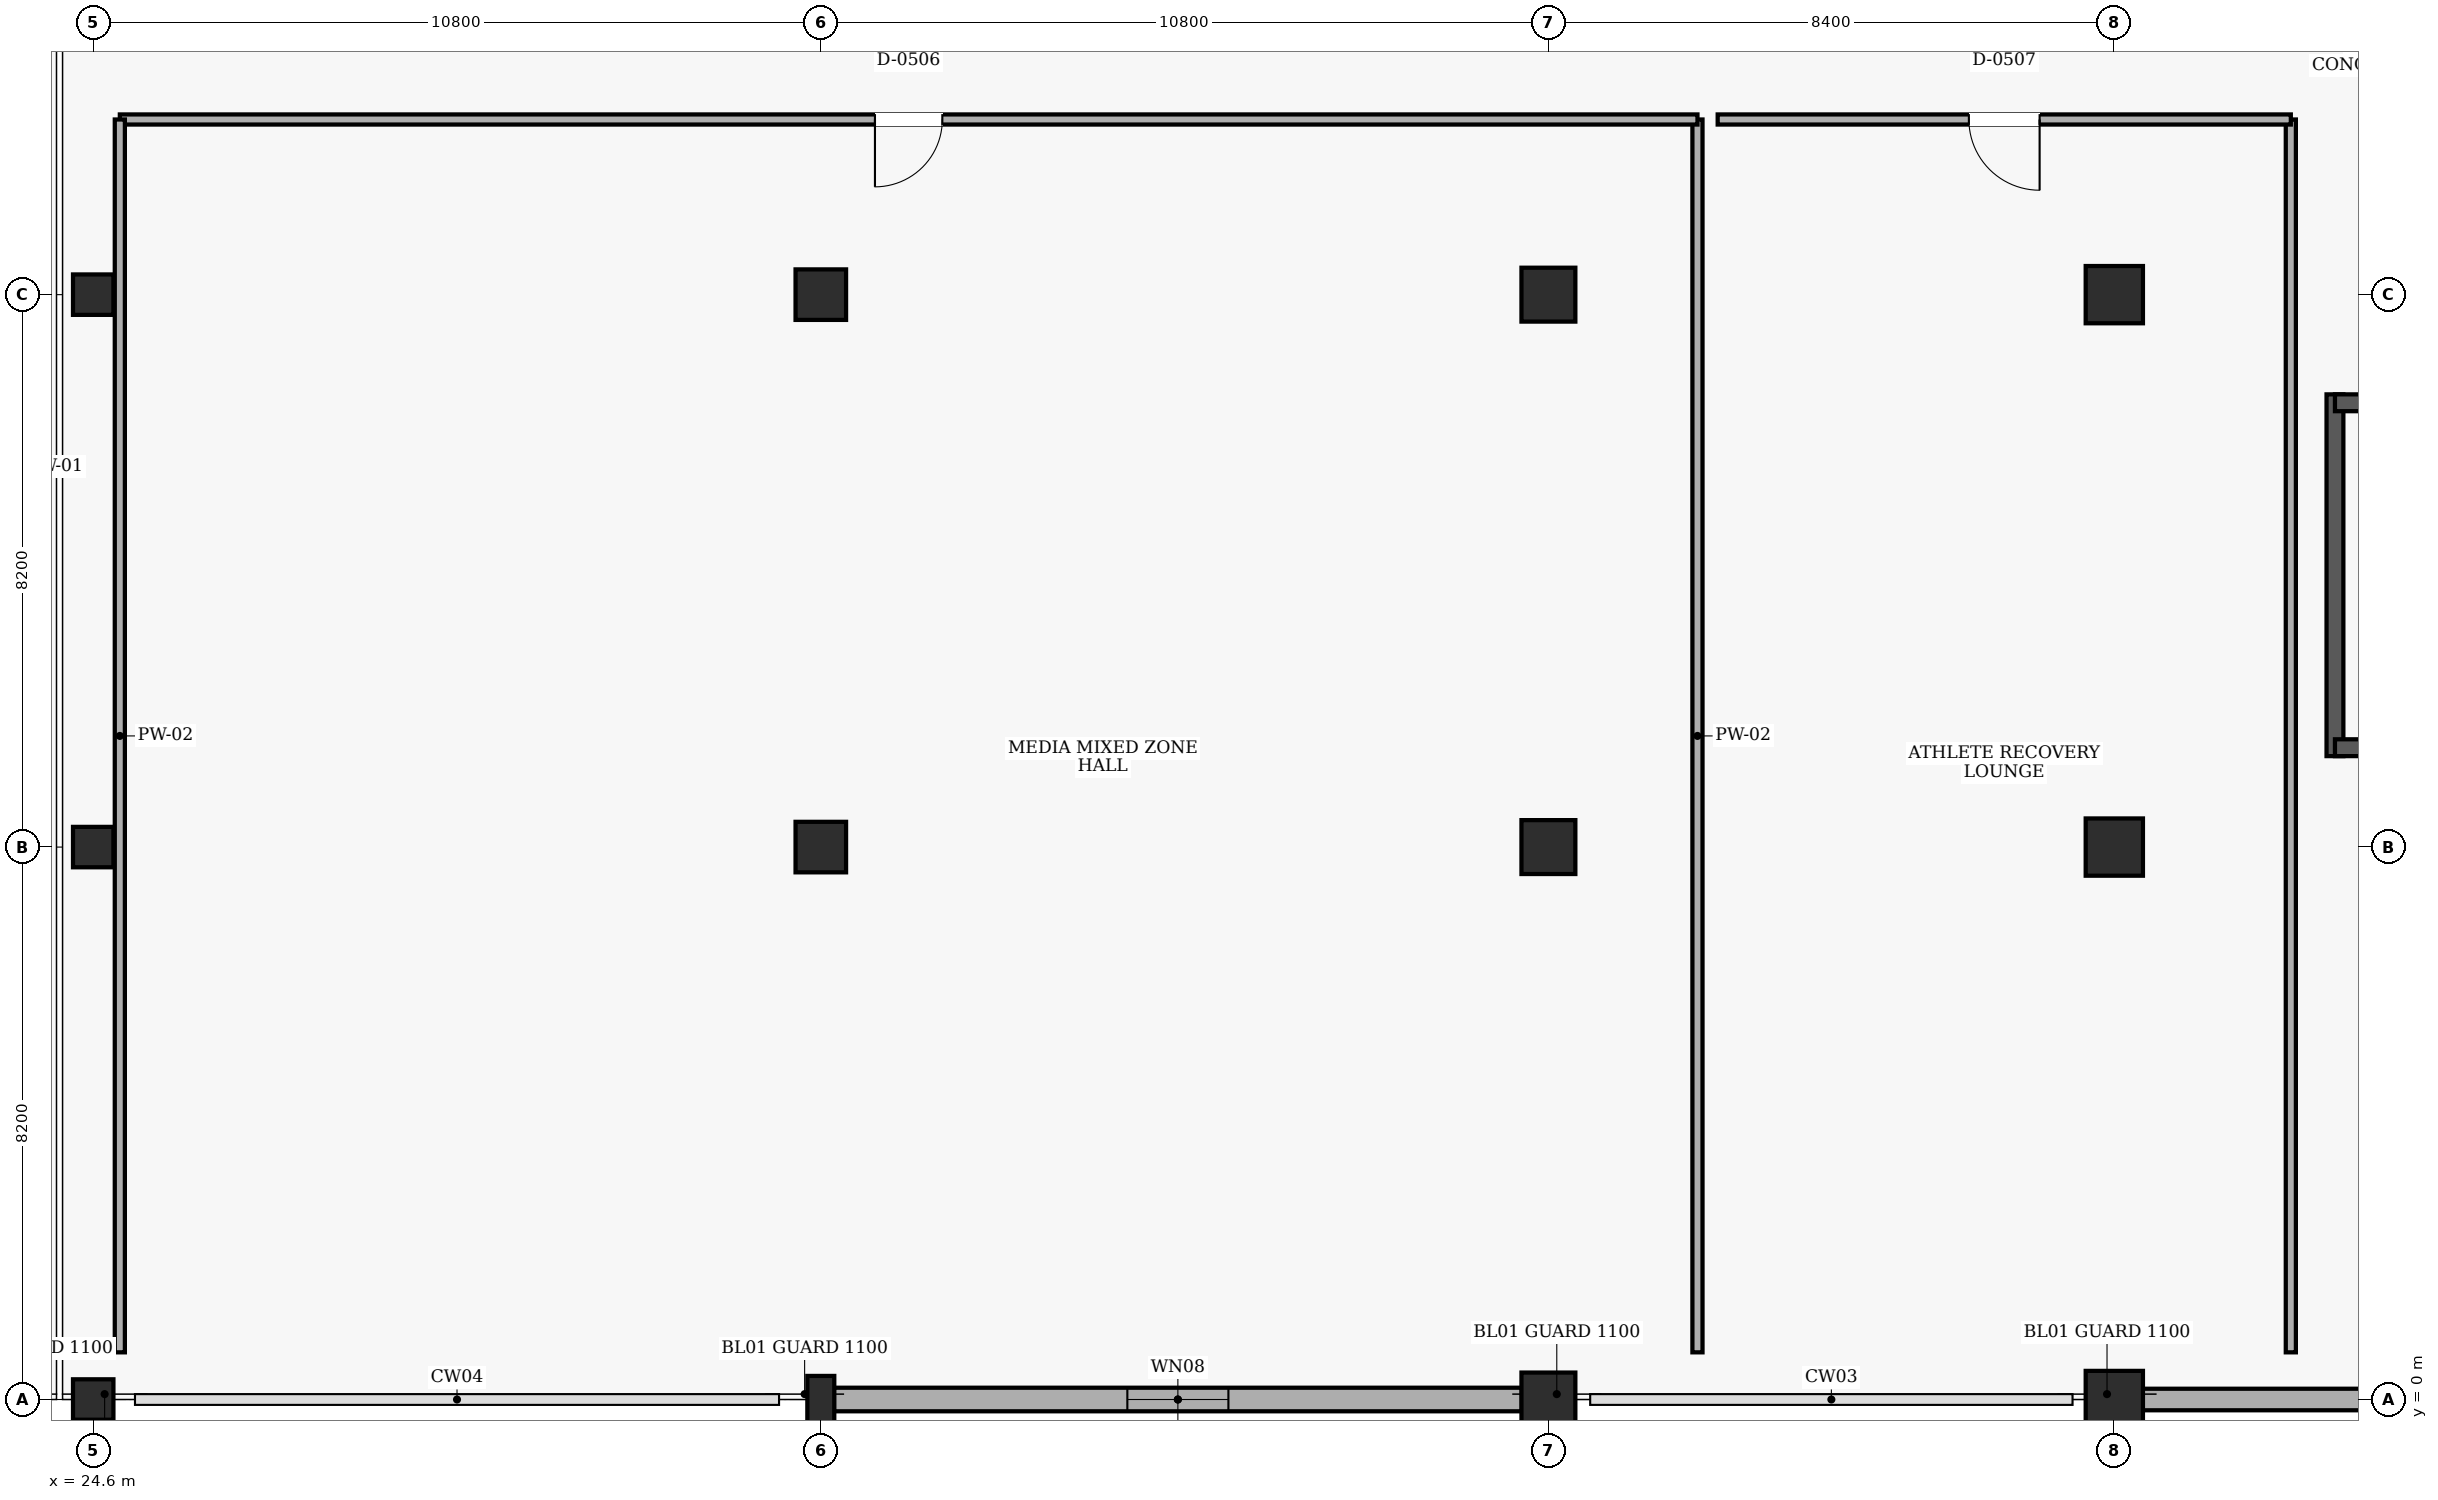
"""IFC4 building model, lengths in metres.
Left out: names, types, materials, properties, quantities, classifications, styles, units other than length and angle.
Written with IfcOpenShell. Run it as: python <this file> out.ifc"""

import sys

from ifc_helpers import new_model, si_unit, direction, frame, frame_2d, origin, origin_2d, place, context, subcontext, project, spatial, rectangle, extrude, element, fill, save


model = new_model("IFC4")
c1 = context("Model", 3, precision=1e-05, world=origin(), true_north=direction((0.0, 1.0)))
c2 = subcontext(c1, "Body", "Model", "MODEL_VIEW")
j1 = project(units=[si_unit("LENGTHUNIT", "METRE"), si_unit("PLANEANGLEUNIT", "RADIAN")], contexts=[c1])
p1 = place(None, origin())
s1 = spatial("IfcSite", under=j1, at=p1, CompositionType="ELEMENT")
p2 = place(p1, origin())
s2 = spatial("IfcBuilding", under=s1, at=p2, CompositionType="ELEMENT")
p3 = place(p2, frame((0.0, 0.0, 5.4)))
s3 = spatial("IfcBuildingStorey", under=s2, at=p3, CompositionType="ELEMENT", Elevation=5.4)
for number, where, z_axis, x_axis in (
    (1, (24.6, 0.0, 0.0), (0.0, 0.0, 1.0), (1.0, 0.0, 0.0)),
    (2, (24.6, 8.2, 0.0), (0.0, 0.0, 1.0), (1.0, 0.0, 0.0)),
    (3, (24.6, 16.4, 0.0), (0.0, 0.0, 1.0), (1.0, 0.0, 0.0)),
):
    element("IfcColumn", number, at=place(p3, frame(where, z_axis=z_axis, x_axis=x_axis)), inside=s3, PredefinedType="COLUMN", context=c2, shape_type="SweptSolid", body=[
        extrude(rectangle(XDim=0.6, YDim=0.6, at=origin_2d()), origin(), (0.0, 0.0, 1.0), 4.8),
    ])
p4 = place(p3, frame((35.4, 0.0, 0.0), z_axis=(0.0, 0.0, 1.0), x_axis=(1.0, 0.0, 0.0)))
e4 = element("IfcColumn", 4, at=p4, inside=s3, PredefinedType="PILASTER", context=c2, shape_type="SweptSolid", body=[
    extrude(rectangle(XDim=0.4, YDim=0.7, at=origin_2d()), origin(), (0.0, 0.0, 1.0), 4.8),
])
for number, where, z_axis, x_axis in (
    (5, (35.4, 8.2, 0.0), (0.0, 0.0, 1.0), (1.0, 0.0, 0.0)),
    (6, (35.4, 16.4, 0.0), (0.0, 0.0, 1.0), (1.0, 0.0, 0.0)),
):
    element("IfcColumn", number, at=place(p3, frame(where, z_axis=z_axis, x_axis=x_axis)), inside=s3, PredefinedType="COLUMN", context=c2, shape_type="SweptSolid", body=[
        extrude(rectangle(XDim=0.75, YDim=0.75, at=origin_2d()), origin(), (0.0, 0.0, 1.0), 4.8),
    ])
for number, where, z_axis, x_axis in (
    (7, (46.2, 0.0, 0.0), (0.0, 0.0, 1.0), (1.0, 0.0, 0.0)),
    (8, (46.2, 8.2, 0.0), (0.0, 0.0, 1.0), (1.0, 0.0, 0.0)),
    (9, (46.2, 16.4, 0.0), (0.0, 0.0, 1.0), (1.0, 0.0, 0.0)),
):
    element("IfcColumn", number, at=place(p3, frame(where, z_axis=z_axis, x_axis=x_axis)), inside=s3, PredefinedType="COLUMN", context=c2, shape_type="SweptSolid", body=[
        extrude(rectangle(XDim=0.8, YDim=0.8, at=origin_2d()), origin(), (0.0, 0.0, 1.0), 4.8),
    ])
for number, where, z_axis, x_axis in (
    (10, (54.6, 0.0, 0.0), (0.0, 0.0, 1.0), (1.0, 0.0, 0.0)),
    (11, (54.6, 8.2, 0.0), (0.0, 0.0, 1.0), (1.0, 0.0, 0.0)),
    (12, (54.6, 16.4, 0.0), (0.0, 0.0, 1.0), (1.0, 0.0, 0.0)),
):
    element("IfcColumn", number, at=place(p3, frame(where, z_axis=z_axis, x_axis=x_axis)), inside=s3, PredefinedType="COLUMN", context=c2, shape_type="SweptSolid", body=[
        extrude(rectangle(XDim=0.85, YDim=0.85, at=origin_2d()), origin(), (0.0, 0.0, 1.0), 4.8),
    ])
p5 = place(p3, frame((63.38, 0.0, 0.0), z_axis=(0.0, 0.0, 1.0), x_axis=(-1.0, 0.0, 0.0)))
e13 = element("IfcWall", 13, at=p5, inside=s3, PredefinedType="SOLIDWALL", context=c2, shape_type="SweptSolid", body=[
    extrude(rectangle(XDim=8.36, YDim=0.32, at=frame_2d((4.18, 0.0))), origin(), (0.0, 0.0, 1.0), 3.68),
])
p6 = place(p5, frame((3.58, 0.0, 0.9)))
e14 = element("IfcOpeningElement", 14, at=p6, cuts=e13, PredefinedType="OPENING", context=c2, shape_type="SweptSolid", body=[
    extrude(rectangle(XDim=1.2, YDim=1.8, at=frame_2d((0.6, 0.9))), frame((0.0, 0.17, 0.0), z_axis=(0.0, -1.0, 0.0), x_axis=(1.0, 0.0, 0.0)), (0.0, 0.0, 1.0), 0.34),
])
p7 = place(p3, frame((45.805, 0.0, 0.0), z_axis=(0.0, 0.0, 1.0), x_axis=(-1.0, 0.0, 0.0)))
e15 = element("IfcWall", 15, at=p7, inside=s3, PredefinedType="SOLIDWALL", context=c2, shape_type="SweptSolid", body=[
    extrude(rectangle(XDim=10.21, YDim=0.35, at=frame_2d((5.105, 0.0))), origin(), (0.0, 0.0, 1.0), 3.58),
])
p8 = place(p7, frame((4.355, 0.0, 0.9)))
e16 = element("IfcOpeningElement", 16, at=p8, cuts=e15, PredefinedType="OPENING", context=c2, shape_type="SweptSolid", body=[
    extrude(rectangle(XDim=1.5, YDim=1.8, at=frame_2d((0.75, 0.9))), frame((0.0, 0.185, 0.0), z_axis=(0.0, -1.0, 0.0), x_axis=(1.0, 0.0, 0.0)), (0.0, 0.0, 1.0), 0.37),
])
p9 = place(p3, frame((57.875, 14.92, 0.0), z_axis=(0.0, 0.0, 1.0), x_axis=(0.0, -1.0, 0.0)))
e17 = element("IfcWall", 17, at=p9, inside=s3, PredefinedType="SHEAR", context=c2, shape_type="SweptSolid", body=[
    extrude(rectangle(XDim=5.37, YDim=0.25, at=frame_2d((2.685, 0.0))), origin(), (0.0, 0.0, 1.0), 4.5),
])
p10 = place(p3, frame((57.875, 14.795, 0.0), z_axis=(0.0, 0.0, 1.0), x_axis=(1.0, 0.0, 0.0)))
e18 = element("IfcWall", 18, at=p10, inside=s3, PredefinedType="SHEAR", context=c2, shape_type="SweptSolid", body=[
    extrude(rectangle(XDim=10.85, YDim=0.25, at=frame_2d((5.425, 0.0))), origin(), (0.0, 0.0, 1.0), 4.5),
])
p11 = place(p10, frame((0.52, 0.0, 0.0)))
e19 = element("IfcOpeningElement", 19, at=p11, cuts=e18, PredefinedType="OPENING", context=c2, shape_type="SweptSolid", body=[
    extrude(rectangle(XDim=1.4, YDim=2.15, at=frame_2d((0.7, 1.075))), frame((0.0, 0.135, 0.0), z_axis=(0.0, -1.0, 0.0), x_axis=(1.0, 0.0, 0.0)), (0.0, 0.0, 1.0), 0.27),
])
p12 = place(p3, frame((57.875, 9.675, 0.0), z_axis=(0.0, 0.0, 1.0), x_axis=(1.0, 0.0, 0.0)))
e20 = element("IfcWall", 20, at=p12, inside=s3, PredefinedType="SHEAR", context=c2, shape_type="SweptSolid", body=[
    extrude(rectangle(XDim=10.85, YDim=0.25, at=frame_2d((5.425, 0.0))), origin(), (0.0, 0.0, 1.0), 4.5),
])
p13 = place(p3, frame((48.413, 0.7, 0.0), z_axis=(0.0, 0.0, 1.0), x_axis=(0.0, 1.0, 0.0)))
e21 = element("IfcWall", 21, at=p13, inside=s3, PredefinedType="PARTITIONING", context=c2, shape_type="SweptSolid", body=[
    extrude(rectangle(XDim=18.3, YDim=0.15, at=frame_2d((9.15, 0.0))), origin(), (0.0, 0.0, 1.0), 4.5),
])
p14 = place(p3, frame((48.413, 19.0, 0.0), z_axis=(0.0, 0.0, 1.0), x_axis=(-1.0, 0.0, 0.0)))
e22 = element("IfcWall", 22, at=p14, inside=s3, PredefinedType="PARTITIONING", context=c2, shape_type="SweptSolid", body=[
    extrude(rectangle(XDim=23.417, YDim=0.15, at=frame_2d((11.709, 0.0))), origin(), (0.0, 0.0, 1.0), 4.5),
])
p15 = place(p14, frame((11.209, 0.0, 0.0)))
e23 = element("IfcOpeningElement", 23, at=p15, cuts=e22, PredefinedType="OPENING", context=c2, shape_type="SweptSolid", body=[
    extrude(rectangle(XDim=1.0, YDim=2.1, at=frame_2d((0.5, 1.05))), frame((0.0, 0.085, 0.0), z_axis=(0.0, -1.0, 0.0), x_axis=(1.0, 0.0, 0.0)), (0.0, 0.0, 1.0), 0.17),
])
p16 = place(p3, frame((24.995, 19.0, 0.0), z_axis=(0.0, 0.0, 1.0), x_axis=(0.0, -1.0, 0.0)))
e24 = element("IfcWall", 24, at=p16, inside=s3, PredefinedType="PARTITIONING", context=c2, shape_type="SweptSolid", body=[
    extrude(rectangle(XDim=18.3, YDim=0.15, at=frame_2d((9.15, 0.0))), origin(), (0.0, 0.0, 1.0), 3.88),
])
p17 = place(p3, frame((57.22, 0.7, 0.0), z_axis=(0.0, 0.0, 1.0), x_axis=(0.0, 1.0, 0.0)))
e25 = element("IfcWall", 25, at=p17, inside=s3, PredefinedType="PARTITIONING", context=c2, shape_type="SweptSolid", body=[
    extrude(rectangle(XDim=18.3, YDim=0.15, at=frame_2d((9.15, 0.0))), origin(), (0.0, 0.0, 1.0), 4.5),
])
p18 = place(p3, frame((57.22, 19.0, 0.0), z_axis=(0.0, 0.0, 1.0), x_axis=(-1.0, 0.0, 0.0)))
e26 = element("IfcWall", 26, at=p18, inside=s3, PredefinedType="PARTITIONING", context=c2, shape_type="SweptSolid", body=[
    extrude(rectangle(XDim=8.508, YDim=0.15, at=frame_2d((4.254, 0.0))), origin(), (0.0, 0.0, 1.0), 4.5),
])
p19 = place(p18, frame((3.729, 0.0, 0.0)))
e27 = element("IfcOpeningElement", 27, at=p19, cuts=e26, PredefinedType="OPENING", context=c2, shape_type="SweptSolid", body=[
    extrude(rectangle(XDim=1.05, YDim=2.15, at=frame_2d((0.525, 1.075))), frame((0.0, 0.085, 0.0), z_axis=(0.0, -1.0, 0.0), x_axis=(1.0, 0.0, 0.0)), (0.0, 0.0, 1.0), 0.17),
])
p20 = place(p8, origin())
e28 = element("IfcWindow", 28, at=p20, inside=s3, PartitioningType="SINGLE_PANEL", PredefinedType="WINDOW", context=c2, shape_type="SweptSolid", body=[
    extrude(rectangle(XDim=1.5, YDim=1.8, at=frame_2d((0.75, 0.9))), frame((0.0, 0.03, 0.0), z_axis=(0.0, -1.0, 0.0), x_axis=(1.0, 0.0, 0.0)), (0.0, 0.0, 1.0), 0.06),
])
fill(e16, e28)
p21 = place(p15, origin())
e29 = element("IfcDoor", 29, at=p21, inside=s3, OperationType="SINGLE_SWING_RIGHT", PredefinedType="DOOR", context=c2, shape_type="SweptSolid", body=[
    extrude(rectangle(XDim=1.0, YDim=2.1, at=frame_2d((0.5, 1.05))), frame((0.0, 0.025, 0.0), z_axis=(0.0, -1.0, 0.0), x_axis=(1.0, 0.0, 0.0)), (0.0, 0.0, 1.0), 0.05),
])
fill(e23, e29)
p22 = place(p19, origin())
e30 = element("IfcDoor", 30, at=p22, inside=s3, OperationType="SINGLE_SWING_LEFT", PredefinedType="DOOR", context=c2, shape_type="SweptSolid", body=[
    extrude(rectangle(XDim=1.05, YDim=2.15, at=frame_2d((0.525, 1.075))), frame((0.0, 0.025, 0.0), z_axis=(0.0, -1.0, 0.0), x_axis=(1.0, 0.0, 0.0)), (0.0, 0.0, 1.0), 0.05),
])
fill(e27, e30)
save(model, sys.argv[1])
